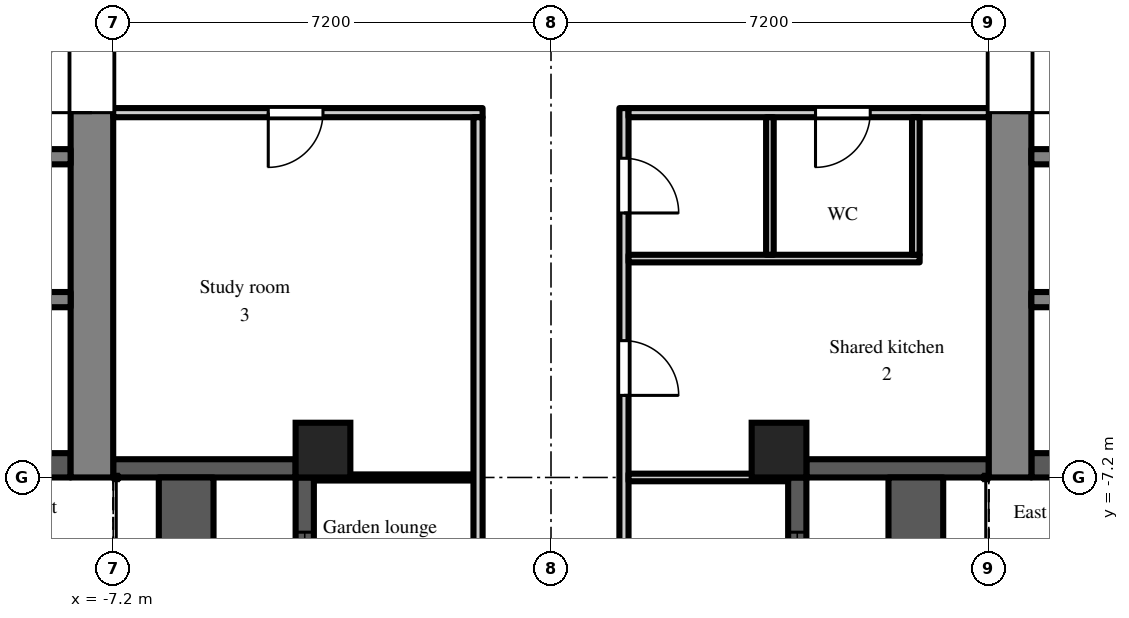
"""IFC4 building model, lengths in metres.
Left out: names, types, materials, properties, quantities, classifications, styles, units other than length and angle.
Written with IfcOpenShell. Run it as: python <this file> out.ifc"""

import sys

from ifc_helpers import new_model, si_unit, direction, frame, frame_2d, origin, origin_2d, place, context, subcontext, project, spatial, rectangle, extrude, element, fill, save


model = new_model("IFC4")
c1 = context("Model", 3, precision=1e-05, world=origin(), true_north=direction((0.0, 1.0)))
c2 = subcontext(c1, "Body", "Model", "MODEL_VIEW")
j1 = project(units=[si_unit("LENGTHUNIT", "METRE"), si_unit("PLANEANGLEUNIT", "RADIAN")], contexts=[c1])
p1 = place(None, origin())
s1 = spatial("IfcSite", under=j1, at=p1, CompositionType="ELEMENT")
p2 = place(p1, origin())
s2 = spatial("IfcBuilding", under=s1, at=p2, CompositionType="ELEMENT")
p3 = place(p2, frame((0.0, 0.0, 207.9)))
s3 = spatial("IfcBuildingStorey", under=s2, at=p3, CompositionType="ELEMENT", Elevation=207.9)
for number, where, z_axis, x_axis in (
    (1, (-3.75, -6.75, 0.0), (0.0, 0.0, 1.0), (1.0, 0.0, 0.0)),
    (2, (3.75, -6.75, 0.0), (0.0, 0.0, 1.0), (1.0, 0.0, 0.0)),
):
    element("IfcColumn", number, at=place(p3, frame(where, z_axis=z_axis, x_axis=x_axis)), inside=s3, PredefinedType="COLUMN", context=c2, shape_type="SweptSolid", body=[
        extrude(rectangle(XDim=0.9, YDim=0.9, at=origin_2d()), origin(), (0.0, 0.0, 1.0), 3.0),
    ])
p4 = place(p3, frame((-7.2, -7.05, 0.0), z_axis=(0.0, 0.0, 1.0), x_axis=(1.0, 0.0, 0.0)))
e3 = element("IfcWall", 3, at=p4, inside=s3, PredefinedType="SOLIDWALL", context=c2, shape_type="SweptSolid", body=[
    extrude(rectangle(XDim=3.0, YDim=0.3, at=frame_2d((1.5, 0.0))), origin(), (0.0, 0.0, 1.0), 2.3),
])
p5 = place(p3, frame((-4.05, -7.2, 0.0), z_axis=(0.0, 0.0, 1.0), x_axis=(0.0, -1.0, 0.0)))
e4 = element("IfcWall", 4, at=p5, inside=s3, PredefinedType="SOLIDWALL", context=c2, shape_type="SweptSolid", body=[
    extrude(rectangle(XDim=7.2, YDim=0.3, at=frame_2d((3.6, 0.0))), origin(), (0.0, 0.0, 1.0), 2.3),
])
p6 = place(p5, frame((3.0, 0.0, 0.0)))
e5 = element("IfcOpeningElement", 5, at=p6, cuts=e4, PredefinedType="OPENING", context=c2, shape_type="SweptSolid", body=[
    extrude(rectangle(XDim=1.2, YDim=2.05, at=frame_2d((0.6, 1.025))), frame((0.0, 0.16, 0.0), z_axis=(0.0, -1.0, 0.0), x_axis=(1.0, 0.0, 0.0)), (0.0, 0.0, 1.0), 0.32),
])
p7 = place(p5, frame((0.9, 0.0, 0.2)))
e6 = element("IfcOpeningElement", 6, at=p7, cuts=e4, PredefinedType="OPENING", context=c2, shape_type="SweptSolid", body=[
    extrude(rectangle(XDim=1.8, YDim=1.85, at=frame_2d((0.9, 0.925))), frame((0.0, 0.16, 0.0), z_axis=(0.0, -1.0, 0.0), x_axis=(1.0, 0.0, 0.0)), (0.0, 0.0, 1.0), 0.32),
])
p8 = place(p5, frame((4.5, 0.0, 0.2)))
e7 = element("IfcOpeningElement", 7, at=p8, cuts=e4, PredefinedType="OPENING", context=c2, shape_type="SweptSolid", body=[
    extrude(rectangle(XDim=1.8, YDim=1.85, at=frame_2d((0.9, 0.925))), frame((0.0, 0.16, 0.0), z_axis=(0.0, -1.0, 0.0), x_axis=(1.0, 0.0, 0.0)), (0.0, 0.0, 1.0), 0.32),
])
p9 = place(p3, frame((4.05, -14.4, 0.0), z_axis=(0.0, 0.0, 1.0), x_axis=(0.0, 1.0, 0.0)))
e8 = element("IfcWall", 8, at=p9, inside=s3, PredefinedType="SOLIDWALL", context=c2, shape_type="SweptSolid", body=[
    extrude(rectangle(XDim=7.2, YDim=0.3, at=frame_2d((3.6, 0.0))), origin(), (0.0, 0.0, 1.0), 2.3),
])
p10 = place(p9, frame((3.0, 0.0, 0.0)))
e9 = element("IfcOpeningElement", 9, at=p10, cuts=e8, PredefinedType="OPENING", context=c2, shape_type="SweptSolid", body=[
    extrude(rectangle(XDim=1.2, YDim=2.05, at=frame_2d((0.6, 1.025))), frame((0.0, 0.16, 0.0), z_axis=(0.0, -1.0, 0.0), x_axis=(1.0, 0.0, 0.0)), (0.0, 0.0, 1.0), 0.32),
])
p11 = place(p9, frame((0.9, 0.0, 0.2)))
e10 = element("IfcOpeningElement", 10, at=p11, cuts=e8, PredefinedType="OPENING", context=c2, shape_type="SweptSolid", body=[
    extrude(rectangle(XDim=1.8, YDim=1.85, at=frame_2d((0.9, 0.925))), frame((0.0, 0.16, 0.0), z_axis=(0.0, -1.0, 0.0), x_axis=(1.0, 0.0, 0.0)), (0.0, 0.0, 1.0), 0.32),
])
p12 = place(p9, frame((4.5, 0.0, 0.2)))
e11 = element("IfcOpeningElement", 11, at=p12, cuts=e8, PredefinedType="OPENING", context=c2, shape_type="SweptSolid", body=[
    extrude(rectangle(XDim=1.8, YDim=1.85, at=frame_2d((0.9, 0.925))), frame((0.0, 0.16, 0.0), z_axis=(0.0, -1.0, 0.0), x_axis=(1.0, 0.0, 0.0)), (0.0, 0.0, 1.0), 0.32),
])
p13 = place(p3, frame((4.2, -7.05, 0.0), z_axis=(0.0, 0.0, 1.0), x_axis=(1.0, 0.0, 0.0)))
e12 = element("IfcWall", 12, at=p13, inside=s3, PredefinedType="SOLIDWALL", context=c2, shape_type="SweptSolid", body=[
    extrude(rectangle(XDim=3.0, YDim=0.3, at=frame_2d((1.5, 0.0))), origin(), (0.0, 0.0, 1.0), 2.3),
])
for number, where, z_axis, x_axis in (
    (13, (6.0, -14.4, 0.0), (0.0, 0.0, 1.0), (0.0, 1.0, 0.0)),
    (14, (-6.0, -14.4, 0.0), (0.0, 0.0, 1.0), (0.0, 1.0, 0.0)),
):
    element("IfcWall", number, at=place(p3, frame(where, z_axis=z_axis, x_axis=x_axis)), inside=s3, PredefinedType="PARAPET", context=c2, shape_type="SweptSolid", body=[
        extrude(rectangle(XDim=7.2, YDim=0.9, at=frame_2d((3.6, 0.0))), origin(), (0.0, 0.0, 1.0), 0.8),
    ])
p14 = place(p3, frame((7.55, -7.2, 0.0), z_axis=(0.0, 0.0, 1.0), x_axis=(0.0, 1.0, 0.0)))
e15 = element("IfcWall", 15, at=p14, inside=s3, PredefinedType="SHEAR", context=c2, shape_type="SweptSolid", body=[
    extrude(rectangle(XDim=14.4, YDim=0.7, at=frame_2d((7.2, 0.0))), origin(), (0.0, 0.0, 1.0), 2.6),
])
p15 = place(p14, frame((6.0, 0.0, 0.0)))
e16 = element("IfcOpeningElement", 16, at=p15, cuts=e15, PredefinedType="OPENING", context=c2, shape_type="SweptSolid", body=[
    extrude(rectangle(XDim=2.4, YDim=2.2, at=frame_2d((1.2, 1.1))), frame((0.0, 0.36, 0.0), z_axis=(0.0, -1.0, 0.0), x_axis=(1.0, 0.0, 0.0)), (0.0, 0.0, 1.0), 0.72),
])
p16 = place(p3, frame((7.9, -7.0, 0.0), z_axis=(0.0, 0.0, 1.0), x_axis=(1.0, 0.0, 0.0)))
e17 = element("IfcWall", 17, at=p16, inside=s3, PredefinedType="SHEAR", context=c2, shape_type="SweptSolid", body=[
    extrude(rectangle(XDim=12.95, YDim=0.4, at=frame_2d((6.475, 0.0))), origin(), (0.0, 0.0, 1.0), 2.6),
])
p17 = place(p3, frame((7.9, -1.925, 0.0), z_axis=(0.0, 0.0, 1.0), x_axis=(1.0, 0.0, 0.0)))
e18 = element("IfcWall", 18, at=p17, inside=s3, PredefinedType="SHEAR", context=c2, shape_type="SweptSolid", body=[
    extrude(rectangle(XDim=12.95, YDim=0.25, at=frame_2d((6.475, 0.0))), origin(), (0.0, 0.0, 1.0), 2.6),
])
p18 = place(p17, frame((0.525, 0.0, 0.0)))
e19 = element("IfcOpeningElement", 19, at=p18, cuts=e18, PredefinedType="OPENING", context=c2, shape_type="SweptSolid", body=[
    extrude(rectangle(XDim=0.9, YDim=2.1, at=frame_2d((0.45, 1.05))), frame((0.0, 0.135, 0.0), z_axis=(0.0, -1.0, 0.0), x_axis=(1.0, 0.0, 0.0)), (0.0, 0.0, 1.0), 0.27),
])
p19 = place(p17, frame((2.625, 0.0, 0.0)))
e20 = element("IfcOpeningElement", 20, at=p19, cuts=e18, PredefinedType="OPENING", context=c2, shape_type="SweptSolid", body=[
    extrude(rectangle(XDim=1.1, YDim=2.1, at=frame_2d((0.55, 1.05))), frame((0.0, 0.135, 0.0), z_axis=(0.0, -1.0, 0.0), x_axis=(1.0, 0.0, 0.0)), (0.0, 0.0, 1.0), 0.27),
])
p20 = place(p17, frame((4.925, 0.0, 0.0)))
e21 = element("IfcOpeningElement", 21, at=p20, cuts=e18, PredefinedType="OPENING", context=c2, shape_type="SweptSolid", body=[
    extrude(rectangle(XDim=0.9, YDim=2.1, at=frame_2d((0.45, 1.05))), frame((0.0, 0.135, 0.0), z_axis=(0.0, -1.0, 0.0), x_axis=(1.0, 0.0, 0.0)), (0.0, 0.0, 1.0), 0.27),
])
p21 = place(p17, frame((8.225, 0.0, 0.0)))
e22 = element("IfcOpeningElement", 22, at=p21, cuts=e18, PredefinedType="OPENING", context=c2, shape_type="SweptSolid", body=[
    extrude(rectangle(XDim=0.9, YDim=2.1, at=frame_2d((0.45, 1.05))), frame((0.0, 0.135, 0.0), z_axis=(0.0, -1.0, 0.0), x_axis=(1.0, 0.0, 0.0)), (0.0, 0.0, 1.0), 0.27),
])
p22 = place(p17, frame((11.525, 0.0, 0.0)))
e23 = element("IfcOpeningElement", 23, at=p22, cuts=e18, PredefinedType="OPENING", context=c2, shape_type="SweptSolid", body=[
    extrude(rectangle(XDim=0.9, YDim=2.1, at=frame_2d((0.45, 1.05))), frame((0.0, 0.135, 0.0), z_axis=(0.0, -1.0, 0.0), x_axis=(1.0, 0.0, 0.0)), (0.0, 0.0, 1.0), 0.27),
])
p23 = place(p3, frame((7.9, -4.275, 0.0), z_axis=(0.0, 0.0, 1.0), x_axis=(1.0, 0.0, 0.0)))
e24 = element("IfcWall", 24, at=p23, inside=s3, PredefinedType="SHEAR", context=c2, shape_type="SweptSolid", body=[
    extrude(rectangle(XDim=1.95, YDim=0.25, at=frame_2d((0.975, 0.0))), origin(), (0.0, 0.0, 1.0), 2.6),
])
p24 = place(p3, frame((-7.55, -7.2, 0.0), z_axis=(0.0, 0.0, 1.0), x_axis=(0.0, 1.0, 0.0)))
e25 = element("IfcWall", 25, at=p24, inside=s3, PredefinedType="SHEAR", context=c2, shape_type="SweptSolid", body=[
    extrude(rectangle(XDim=14.4, YDim=0.7, at=frame_2d((7.2, 0.0))), origin(), (0.0, 0.0, 1.0), 2.6),
])
p25 = place(p24, frame((6.0, 0.0, 0.0)))
e26 = element("IfcOpeningElement", 26, at=p25, cuts=e25, PredefinedType="OPENING", context=c2, shape_type="SweptSolid", body=[
    extrude(rectangle(XDim=2.4, YDim=2.2, at=frame_2d((1.2, 1.1))), frame((0.0, 0.36, 0.0), z_axis=(0.0, -1.0, 0.0), x_axis=(1.0, 0.0, 0.0)), (0.0, 0.0, 1.0), 0.72),
])
p26 = place(p3, frame((-7.9, -7.0, 0.0), z_axis=(0.0, 0.0, 1.0), x_axis=(-1.0, 0.0, 0.0)))
e27 = element("IfcWall", 27, at=p26, inside=s3, PredefinedType="SHEAR", context=c2, shape_type="SweptSolid", body=[
    extrude(rectangle(XDim=12.95, YDim=0.4, at=frame_2d((6.475, 0.0))), origin(), (0.0, 0.0, 1.0), 2.6),
])
p27 = place(p3, frame((-7.9, -1.925, 0.0), z_axis=(0.0, 0.0, 1.0), x_axis=(-1.0, 0.0, 0.0)))
e28 = element("IfcWall", 28, at=p27, inside=s3, PredefinedType="SHEAR", context=c2, shape_type="SweptSolid", body=[
    extrude(rectangle(XDim=12.95, YDim=0.25, at=frame_2d((6.475, 0.0))), origin(), (0.0, 0.0, 1.0), 2.6),
])
p28 = place(p27, frame((0.525, 0.0, 0.0)))
e29 = element("IfcOpeningElement", 29, at=p28, cuts=e28, PredefinedType="OPENING", context=c2, shape_type="SweptSolid", body=[
    extrude(rectangle(XDim=0.9, YDim=2.1, at=frame_2d((0.45, 1.05))), frame((0.0, 0.135, 0.0), z_axis=(0.0, -1.0, 0.0), x_axis=(1.0, 0.0, 0.0)), (0.0, 0.0, 1.0), 0.27),
])
p29 = place(p27, frame((2.625, 0.0, 0.0)))
e30 = element("IfcOpeningElement", 30, at=p29, cuts=e28, PredefinedType="OPENING", context=c2, shape_type="SweptSolid", body=[
    extrude(rectangle(XDim=1.1, YDim=2.1, at=frame_2d((0.55, 1.05))), frame((0.0, 0.135, 0.0), z_axis=(0.0, -1.0, 0.0), x_axis=(1.0, 0.0, 0.0)), (0.0, 0.0, 1.0), 0.27),
])
p30 = place(p27, frame((4.925, 0.0, 0.0)))
e31 = element("IfcOpeningElement", 31, at=p30, cuts=e28, PredefinedType="OPENING", context=c2, shape_type="SweptSolid", body=[
    extrude(rectangle(XDim=0.9, YDim=2.1, at=frame_2d((0.45, 1.05))), frame((0.0, 0.135, 0.0), z_axis=(0.0, -1.0, 0.0), x_axis=(1.0, 0.0, 0.0)), (0.0, 0.0, 1.0), 0.27),
])
p31 = place(p27, frame((8.225, 0.0, 0.0)))
e32 = element("IfcOpeningElement", 32, at=p31, cuts=e28, PredefinedType="OPENING", context=c2, shape_type="SweptSolid", body=[
    extrude(rectangle(XDim=0.9, YDim=2.1, at=frame_2d((0.45, 1.05))), frame((0.0, 0.135, 0.0), z_axis=(0.0, -1.0, 0.0), x_axis=(1.0, 0.0, 0.0)), (0.0, 0.0, 1.0), 0.27),
])
p32 = place(p27, frame((11.525, 0.0, 0.0)))
e33 = element("IfcOpeningElement", 33, at=p32, cuts=e28, PredefinedType="OPENING", context=c2, shape_type="SweptSolid", body=[
    extrude(rectangle(XDim=0.9, YDim=2.1, at=frame_2d((0.45, 1.05))), frame((0.0, 0.135, 0.0), z_axis=(0.0, -1.0, 0.0), x_axis=(1.0, 0.0, 0.0)), (0.0, 0.0, 1.0), 0.27),
])
p33 = place(p3, frame((-7.9, -4.275, 0.0), z_axis=(0.0, 0.0, 1.0), x_axis=(-1.0, 0.0, 0.0)))
e34 = element("IfcWall", 34, at=p33, inside=s3, PredefinedType="SHEAR", context=c2, shape_type="SweptSolid", body=[
    extrude(rectangle(XDim=1.95, YDim=0.25, at=frame_2d((0.975, 0.0))), origin(), (0.0, 0.0, 1.0), 2.6),
])
p34 = place(p3, frame((-7.2, -1.2, 0.0), z_axis=(0.0, 0.0, 1.0), x_axis=(1.0, 0.0, 0.0)))
e35 = element("IfcWall", 35, at=p34, inside=s3, PredefinedType="PARTITIONING", context=c2, shape_type="SweptSolid", body=[
    extrude(rectangle(XDim=6.075, YDim=0.15, at=frame_2d((3.038, 0.0))), origin(), (0.0, 0.0, 1.0), 2.6),
])
p35 = place(p34, frame((2.55, 0.0, 0.0)))
e36 = element("IfcOpeningElement", 36, at=p35, cuts=e35, PredefinedType="OPENING", context=c2, shape_type="SweptSolid", body=[
    extrude(rectangle(XDim=0.9, YDim=2.1, at=frame_2d((0.45, 1.05))), frame((0.0, 0.085, 0.0), z_axis=(0.0, -1.0, 0.0), x_axis=(1.0, 0.0, 0.0)), (0.0, 0.0, 1.0), 0.17),
])
p36 = place(p3, frame((-3.9, -7.2, 0.0), z_axis=(0.0, 0.0, 1.0), x_axis=(1.0, 0.0, 0.0)))
e37 = element("IfcWall", 37, at=p36, inside=s3, PredefinedType="PARTITIONING", context=c2, shape_type="SweptSolid", body=[
    extrude(rectangle(XDim=2.625, YDim=0.1, at=frame_2d((1.312, 0.0))), origin(), (0.0, 0.0, 1.0), 2.6),
])
p37 = place(p3, frame((-1.2, -19.525, 0.0), z_axis=(0.0, 0.0, 1.0), x_axis=(0.0, 1.0, 0.0)))
e38 = element("IfcWall", 38, at=p37, inside=s3, PredefinedType="PARTITIONING", context=c2, shape_type="SweptSolid", body=[
    extrude(rectangle(XDim=18.25, YDim=0.15, at=frame_2d((9.125, 0.0))), origin(), (0.0, 0.0, 1.0), 2.6),
])
p38 = place(p37, frame((6.075, 0.0, 0.0)))
e39 = element("IfcOpeningElement", 39, at=p38, cuts=e38, PredefinedType="OPENING", context=c2, shape_type="SweptSolid", body=[
    extrude(rectangle(XDim=0.9, YDim=2.1, at=frame_2d((0.45, 1.05))), frame((0.0, 0.085, 0.0), z_axis=(0.0, -1.0, 0.0), x_axis=(1.0, 0.0, 0.0)), (0.0, 0.0, 1.0), 0.17),
])
p39 = place(p37, frame((9.675, 0.0, 0.0)))
e40 = element("IfcOpeningElement", 40, at=p39, cuts=e38, PredefinedType="OPENING", context=c2, shape_type="SweptSolid", body=[
    extrude(rectangle(XDim=0.9, YDim=2.1, at=frame_2d((0.45, 1.05))), frame((0.0, 0.085, 0.0), z_axis=(0.0, -1.0, 0.0), x_axis=(1.0, 0.0, 0.0)), (0.0, 0.0, 1.0), 0.17),
])
p40 = place(p37, frame((1.625, 0.0, 0.0)))
e41 = element("IfcOpeningElement", 41, at=p40, cuts=e38, PredefinedType="OPENING", context=c2, shape_type="SweptSolid", body=[
    extrude(rectangle(XDim=1.8, YDim=2.1, at=frame_2d((0.9, 1.05))), frame((0.0, 0.085, 0.0), z_axis=(0.0, -1.0, 0.0), x_axis=(1.0, 0.0, 0.0)), (0.0, 0.0, 1.0), 0.17),
])
p41 = place(p3, frame((1.2, -19.525, 0.0), z_axis=(0.0, 0.0, 1.0), x_axis=(0.0, 1.0, 0.0)))
e42 = element("IfcWall", 42, at=p41, inside=s3, PredefinedType="PARTITIONING", context=c2, shape_type="SweptSolid", body=[
    extrude(rectangle(XDim=18.4, YDim=0.15, at=frame_2d((9.2, 0.0))), origin(), (0.0, 0.0, 1.0), 2.6),
])
p42 = place(p41, frame((16.675, 0.0, 0.0)))
e43 = element("IfcOpeningElement", 43, at=p42, cuts=e42, PredefinedType="OPENING", context=c2, shape_type="SweptSolid", body=[
    extrude(rectangle(XDim=0.9, YDim=2.1, at=frame_2d((0.45, 1.05))), frame((0.0, 0.085, 0.0), z_axis=(0.0, -1.0, 0.0), x_axis=(1.0, 0.0, 0.0)), (0.0, 0.0, 1.0), 0.17),
])
p43 = place(p41, frame((13.675, 0.0, 0.0)))
e44 = element("IfcOpeningElement", 44, at=p43, cuts=e42, PredefinedType="OPENING", context=c2, shape_type="SweptSolid", body=[
    extrude(rectangle(XDim=0.9, YDim=2.1, at=frame_2d((0.45, 1.05))), frame((0.0, 0.085, 0.0), z_axis=(0.0, -1.0, 0.0), x_axis=(1.0, 0.0, 0.0)), (0.0, 0.0, 1.0), 0.17),
])
p44 = place(p41, frame((6.475, 0.0, 0.0)))
e45 = element("IfcOpeningElement", 45, at=p44, cuts=e42, PredefinedType="OPENING", context=c2, shape_type="SweptSolid", body=[
    extrude(rectangle(XDim=0.9, YDim=2.1, at=frame_2d((0.45, 1.05))), frame((0.0, 0.085, 0.0), z_axis=(0.0, -1.0, 0.0), x_axis=(1.0, 0.0, 0.0)), (0.0, 0.0, 1.0), 0.17),
])
p45 = place(p41, frame((1.625, 0.0, 0.0)))
e46 = element("IfcOpeningElement", 46, at=p45, cuts=e42, PredefinedType="OPENING", context=c2, shape_type="SweptSolid", body=[
    extrude(rectangle(XDim=1.8, YDim=2.1, at=frame_2d((0.9, 1.05))), frame((0.0, 0.085, 0.0), z_axis=(0.0, -1.0, 0.0), x_axis=(1.0, 0.0, 0.0)), (0.0, 0.0, 1.0), 0.17),
])
p46 = place(p3, frame((1.275, -7.2, 0.0), z_axis=(0.0, 0.0, 1.0), x_axis=(1.0, 0.0, 0.0)))
e47 = element("IfcWall", 47, at=p46, inside=s3, PredefinedType="PARTITIONING", context=c2, shape_type="SweptSolid", body=[
    extrude(rectangle(XDim=2.625, YDim=0.125, at=frame_2d((1.312, 0.0))), origin(), (0.0, 0.0, 1.0), 2.6),
])
p47 = place(p3, frame((1.275, -3.6, 0.0), z_axis=(0.0, 0.0, 1.0), x_axis=(1.0, 0.0, 0.0)))
e48 = element("IfcWall", 48, at=p47, inside=s3, PredefinedType="PARTITIONING", context=c2, shape_type="SweptSolid", body=[
    extrude(rectangle(XDim=4.788, YDim=0.125, at=frame_2d((2.394, 0.0))), origin(), (0.0, 0.0, 1.0), 2.6),
])
p48 = place(p3, frame((1.275, -1.2, 0.0), z_axis=(0.0, 0.0, 1.0), x_axis=(1.0, 0.0, 0.0)))
e49 = element("IfcWall", 49, at=p48, inside=s3, PredefinedType="PARTITIONING", context=c2, shape_type="SweptSolid", body=[
    extrude(rectangle(XDim=5.925, YDim=0.15, at=frame_2d((2.962, 0.0))), origin(), (0.0, 0.0, 1.0), 2.6),
])
p49 = place(p48, frame((3.075, 0.0, 0.0)))
e50 = element("IfcOpeningElement", 50, at=p49, cuts=e49, PredefinedType="OPENING", context=c2, shape_type="SweptSolid", body=[
    extrude(rectangle(XDim=0.9, YDim=2.1, at=frame_2d((0.45, 1.05))), frame((0.0, 0.085, 0.0), z_axis=(0.0, -1.0, 0.0), x_axis=(1.0, 0.0, 0.0)), (0.0, 0.0, 1.0), 0.17),
])
for number, where, z_axis, x_axis in (
    (51, (3.6, -3.538, 0.0), (0.0, 0.0, 1.0), (0.0, 1.0, 0.0)),
    (52, (6.0, -3.538, 0.0), (0.0, 0.0, 1.0), (0.0, 1.0, 0.0)),
):
    element("IfcWall", number, at=place(p3, frame(where, z_axis=z_axis, x_axis=x_axis)), inside=s3, PredefinedType="PARTITIONING", context=c2, shape_type="SweptSolid", body=[
        extrude(rectangle(XDim=2.263, YDim=0.125, at=frame_2d((1.131, 0.0))), origin(), (0.0, 0.0, 1.0), 2.6),
    ])
p50 = place(p7, origin())
e53 = element("IfcWindow", 53, at=p50, inside=s3, PartitioningType="SINGLE_PANEL", PredefinedType="WINDOW", context=c2, shape_type="SweptSolid", body=[
    extrude(rectangle(XDim=1.8, YDim=1.85, at=frame_2d((0.9, 0.925))), frame((0.0, 0.03, 0.0), z_axis=(0.0, -1.0, 0.0), x_axis=(1.0, 0.0, 0.0)), (0.0, 0.0, 1.0), 0.06),
])
fill(e6, e53)
p51 = place(p12, origin())
e54 = element("IfcWindow", 54, at=p51, inside=s3, PartitioningType="SINGLE_PANEL", PredefinedType="WINDOW", context=c2, shape_type="SweptSolid", body=[
    extrude(rectangle(XDim=1.8, YDim=1.85, at=frame_2d((0.9, 0.925))), frame((0.0, 0.03, 0.0), z_axis=(0.0, -1.0, 0.0), x_axis=(1.0, 0.0, 0.0)), (0.0, 0.0, 1.0), 0.06),
])
fill(e11, e54)
p52 = place(p15, frame((2.4, 0.0, 0.0), z_axis=(0.0, 0.0, 1.0), x_axis=(-1.0, 0.0, 0.0)))
e55 = element("IfcDoor", 55, at=p52, inside=s3, OperationType="DOUBLE_DOOR_DOUBLE_SWING", PredefinedType="DOOR", context=c2, shape_type="SweptSolid", body=[
    extrude(rectangle(XDim=2.4, YDim=2.2, at=frame_2d((1.2, 1.1))), frame((0.0, 0.025, 0.0), z_axis=(0.0, -1.0, 0.0), x_axis=(1.0, 0.0, 0.0)), (0.0, 0.0, 1.0), 0.05),
])
fill(e16, e55)
p53 = place(p25, origin())
e56 = element("IfcDoor", 56, at=p53, inside=s3, OperationType="DOUBLE_DOOR_DOUBLE_SWING", PredefinedType="DOOR", context=c2, shape_type="SweptSolid", body=[
    extrude(rectangle(XDim=2.4, YDim=2.2, at=frame_2d((1.2, 1.1))), frame((0.0, 0.025, 0.0), z_axis=(0.0, -1.0, 0.0), x_axis=(1.0, 0.0, 0.0)), (0.0, 0.0, 1.0), 0.05),
])
fill(e26, e56)
p54 = place(p42, frame((0.9, 0.0, 0.0), z_axis=(0.0, 0.0, 1.0), x_axis=(-1.0, 0.0, 0.0)))
e57 = element("IfcDoor", 57, at=p54, inside=s3, OperationType="SINGLE_SWING_RIGHT", PredefinedType="DOOR", context=c2, shape_type="SweptSolid", body=[
    extrude(rectangle(XDim=0.9, YDim=2.1, at=frame_2d((0.45, 1.05))), frame((0.0, 0.025, 0.0), z_axis=(0.0, -1.0, 0.0), x_axis=(1.0, 0.0, 0.0)), (0.0, 0.0, 1.0), 0.05),
])
fill(e43, e57)
p55 = place(p49, frame((0.9, 0.0, 0.0), z_axis=(0.0, 0.0, 1.0), x_axis=(-1.0, 0.0, 0.0)))
e58 = element("IfcDoor", 58, at=p55, inside=s3, OperationType="SINGLE_SWING_RIGHT", PredefinedType="DOOR", context=c2, shape_type="SweptSolid", body=[
    extrude(rectangle(XDim=0.9, YDim=2.1, at=frame_2d((0.45, 1.05))), frame((0.0, 0.025, 0.0), z_axis=(0.0, -1.0, 0.0), x_axis=(1.0, 0.0, 0.0)), (0.0, 0.0, 1.0), 0.05),
])
fill(e50, e58)
p56 = place(p43, frame((0.9, 0.0, 0.0), z_axis=(0.0, 0.0, 1.0), x_axis=(-1.0, 0.0, 0.0)))
e59 = element("IfcDoor", 59, at=p56, inside=s3, OperationType="SINGLE_SWING_RIGHT", PredefinedType="DOOR", context=c2, shape_type="SweptSolid", body=[
    extrude(rectangle(XDim=0.9, YDim=2.1, at=frame_2d((0.45, 1.05))), frame((0.0, 0.025, 0.0), z_axis=(0.0, -1.0, 0.0), x_axis=(1.0, 0.0, 0.0)), (0.0, 0.0, 1.0), 0.05),
])
fill(e44, e59)
p57 = place(p35, frame((0.9, 0.0, 0.0), z_axis=(0.0, 0.0, 1.0), x_axis=(-1.0, 0.0, 0.0)))
e60 = element("IfcDoor", 60, at=p57, inside=s3, OperationType="SINGLE_SWING_RIGHT", PredefinedType="DOOR", context=c2, shape_type="SweptSolid", body=[
    extrude(rectangle(XDim=0.9, YDim=2.1, at=frame_2d((0.45, 1.05))), frame((0.0, 0.025, 0.0), z_axis=(0.0, -1.0, 0.0), x_axis=(1.0, 0.0, 0.0)), (0.0, 0.0, 1.0), 0.05),
])
fill(e36, e60)
save(model, sys.argv[1])
